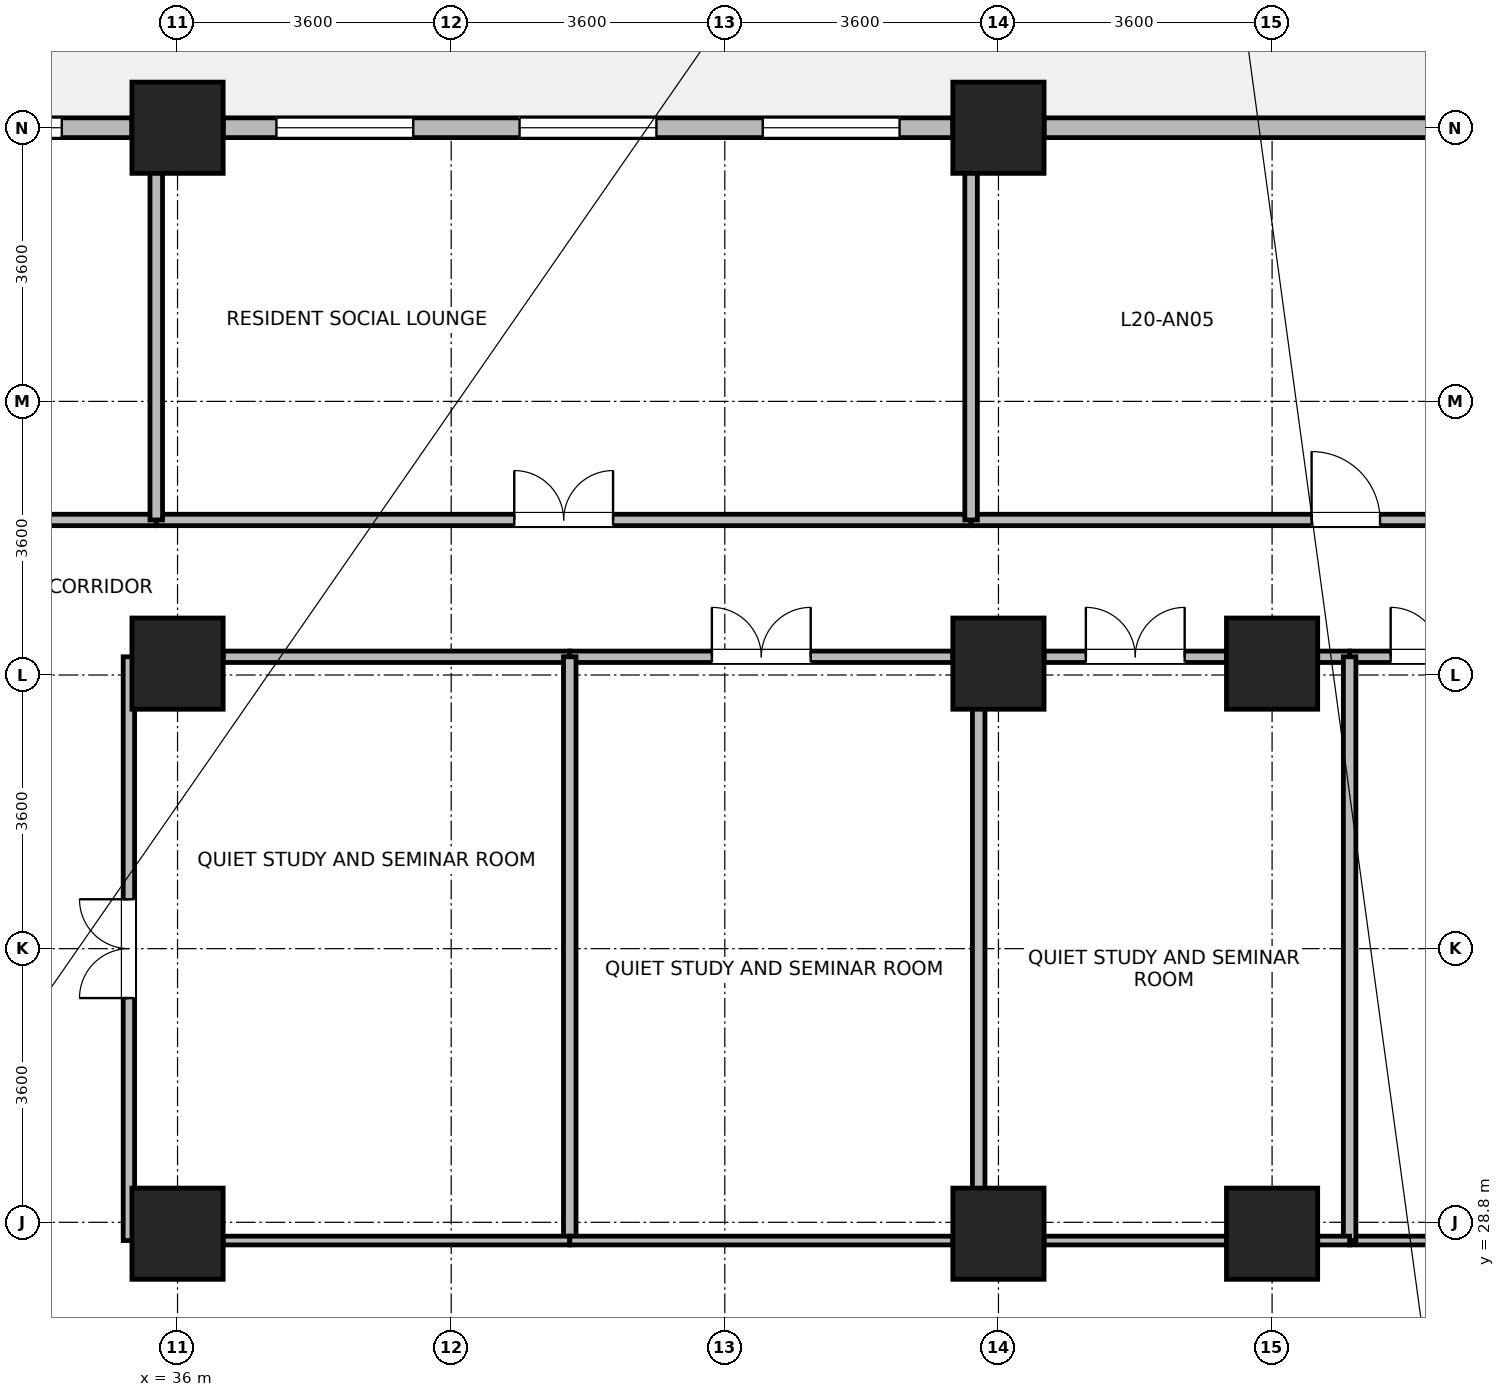
"""IFC4 building model, lengths in metres.
Left out: names, types, materials, properties, quantities, classifications, styles, units other than length and angle.
Written with IfcOpenShell. Run it as: python <this file> out.ifc"""

import sys

from ifc_helpers import new_model, si_unit, direction, frame, frame_2d, origin, origin_2d, place, context, subcontext, project, spatial, rectangle, extrude, source, transform, mapped, element, fill, save


model = new_model("IFC4")
c1 = context("Model", 3, precision=1e-05, world=origin(), true_north=direction((0.0, 1.0)))
c2 = subcontext(c1, "Body", "Model", "MODEL_VIEW")
j1 = project(units=[si_unit("LENGTHUNIT", "METRE"), si_unit("PLANEANGLEUNIT", "RADIAN")], contexts=[c1])
p1 = place(None, origin())
s1 = spatial("IfcSite", under=j1, at=p1, CompositionType="ELEMENT")
p2 = place(p1, origin())
s2 = spatial("IfcBuilding", under=s1, at=p2, CompositionType="ELEMENT")
p3 = place(p2, frame((0.0, 0.0, 82.3)))
s3 = spatial("IfcBuildingStorey", under=s2, at=p3, CompositionType="ELEMENT", Elevation=82.3)
m1 = source(origin(), c2, "Body", "SweptSolid", [
    extrude(rectangle(XDim=1.2, YDim=1.2, at=origin_2d()), origin(), (0.0, 0.0, 1.0), 3.7),
])
for number, where, z_axis, x_axis in (
    (1, (36.0, 43.2, 0.0), (0.0, 0.0, 1.0), (1.0, 0.0, 0.0)),
    (2, (36.0, 28.65, 0.0), (0.0, 0.0, 1.0), (1.0, 0.0, 0.0)),
    (3, (36.0, 36.15, 0.0), (0.0, 0.0, 1.0), (1.0, 0.0, 0.0)),
    (4, (46.8, 28.65, 0.0), (0.0, 0.0, 1.0), (1.0, 0.0, 0.0)),
    (5, (46.8, 36.15, 0.0), (0.0, 0.0, 1.0), (1.0, 0.0, 0.0)),
    (6, (46.8, 43.2, 0.0), (0.0, 0.0, 1.0), (1.0, 0.0, 0.0)),
    (7, (50.4, 28.65, 0.0), (0.0, 0.0, 1.0), (1.0, 0.0, 0.0)),
    (8, (50.4, 36.15, 0.0), (0.0, 0.0, 1.0), (1.0, 0.0, 0.0)),
):
    element("IfcColumn", number, at=place(p3, frame(where, z_axis=z_axis, x_axis=x_axis)), inside=s3, PredefinedType="COLUMN", context=c2, shape_type="MappedRepresentation", body=[
        mapped(m1, transform((0.0, 0.0, 0.0), x_axis=(1.0, 0.0, 0.0), y_axis=(0.0, 1.0, 0.0), z_axis=(0.0, 0.0, 1.0), scale=1.0)),
    ])
p4 = place(p3, frame((47.401, 43.2, 0.0), z_axis=(0.0, 0.0, 1.0), x_axis=(1.0, 0.0, 0.0)))
e9 = element("IfcWall", 9, at=p4, inside=s3, PredefinedType="STANDARD", context=c2, shape_type="SweptSolid", body=[
    extrude(rectangle(XDim=13.164, YDim=0.26, at=frame_2d((6.582, 0.0))), origin(), (0.0, 0.0, 1.0), 3.43),
])
p5 = place(p4, frame((5.832, 0.0, 0.0)))
e10 = element("IfcOpeningElement", 10, at=p5, cuts=e9, PredefinedType="OPENING", context=c2, shape_type="SweptSolid", body=[
    extrude(rectangle(XDim=1.5, YDim=2.15, at=frame_2d((0.75, 1.075))), frame((0.0, 0.14, 0.0), z_axis=(0.0, -1.0, 0.0), x_axis=(1.0, 0.0, 0.0)), (0.0, 0.0, 1.0), 0.28),
])
p6 = place(p3, frame((36.601, 43.2, 0.0), z_axis=(0.0, 0.0, 1.0), x_axis=(1.0, 0.0, 0.0)))
e11 = element("IfcWall", 11, at=p6, inside=s3, PredefinedType="STANDARD", context=c2, shape_type="SweptSolid", body=[
    extrude(rectangle(XDim=9.598, YDim=0.26, at=frame_2d((4.799, 0.0))), origin(), (0.0, 0.0, 1.0), 2.93),
])
p7 = place(p6, frame((0.7, 0.0, 0.85)))
e12 = element("IfcOpeningElement", 12, at=p7, cuts=e11, PredefinedType="OPENING", context=c2, shape_type="SweptSolid", body=[
    extrude(rectangle(XDim=1.8, YDim=1.85, at=frame_2d((0.9, 0.925))), frame((0.0, 0.14, 0.0), z_axis=(0.0, -1.0, 0.0), x_axis=(1.0, 0.0, 0.0)), (0.0, 0.0, 1.0), 0.28),
])
p8 = place(p6, frame((3.899, 0.0, 0.85)))
e13 = element("IfcOpeningElement", 13, at=p8, cuts=e11, PredefinedType="OPENING", context=c2, shape_type="SweptSolid", body=[
    extrude(rectangle(XDim=1.8, YDim=1.85, at=frame_2d((0.9, 0.925))), frame((0.0, 0.14, 0.0), z_axis=(0.0, -1.0, 0.0), x_axis=(1.0, 0.0, 0.0)), (0.0, 0.0, 1.0), 0.28),
])
p9 = place(p6, frame((7.098, 0.0, 0.85)))
e14 = element("IfcOpeningElement", 14, at=p9, cuts=e11, PredefinedType="OPENING", context=c2, shape_type="SweptSolid", body=[
    extrude(rectangle(XDim=1.8, YDim=1.85, at=frame_2d((0.9, 0.925))), frame((0.0, 0.14, 0.0), z_axis=(0.0, -1.0, 0.0), x_axis=(1.0, 0.0, 0.0)), (0.0, 0.0, 1.0), 0.28),
])
p10 = place(p3, frame((32.605, 43.2, 0.0), z_axis=(0.0, 0.0, 1.0), x_axis=(1.0, 0.0, 0.0)))
e15 = element("IfcWall", 15, at=p10, inside=s3, PredefinedType="STANDARD", context=c2, shape_type="SweptSolid", body=[
    extrude(rectangle(XDim=2.793, YDim=0.26, at=frame_2d((1.397, 0.0))), origin(), (0.0, 0.0, 1.0), 2.93),
])
p11 = place(p10, frame((0.922, 0.0, 0.85)))
e16 = element("IfcOpeningElement", 16, at=p11, cuts=e15, PredefinedType="OPENING", context=c2, shape_type="SweptSolid", body=[
    extrude(rectangle(XDim=0.95, YDim=1.75, at=frame_2d((0.475, 0.875))), frame((0.0, 0.14, 0.0), z_axis=(0.0, -1.0, 0.0), x_axis=(1.0, 0.0, 0.0)), (0.0, 0.0, 1.0), 0.28),
])
p12 = place(p3, frame((35.72, 38.04, 0.0), z_axis=(0.0, 0.0, 1.0), x_axis=(1.0, 0.0, 0.0)))
e17 = element("IfcWall", 17, at=p12, inside=s3, PredefinedType="PARTITIONING", context=c2, shape_type="SweptSolid", body=[
    extrude(rectangle(XDim=10.72, YDim=0.15, at=frame_2d((5.36, 0.0))), origin(), (0.0, 0.0, 1.0), 3.43),
])
p13 = place(p12, frame((4.71, 0.0, 0.0)))
e18 = element("IfcOpeningElement", 18, at=p13, cuts=e17, PredefinedType="OPENING", context=c2, shape_type="SweptSolid", body=[
    extrude(rectangle(XDim=1.3, YDim=2.12, at=frame_2d((0.65, 1.06))), frame((0.0, 0.085, 0.0), z_axis=(0.0, -1.0, 0.0), x_axis=(1.0, 0.0, 0.0)), (0.0, 0.0, 1.0), 0.17),
])
p14 = place(p3, frame((46.44, 38.04, 0.0), z_axis=(0.0, 0.0, 1.0), x_axis=(1.0, 0.0, 0.0)))
e19 = element("IfcWall", 19, at=p14, inside=s3, PredefinedType="PARTITIONING", context=c2, shape_type="SweptSolid", body=[
    extrude(rectangle(XDim=9.86, YDim=0.15, at=frame_2d((4.93, 0.0))), origin(), (0.0, 0.0, 1.0), 3.43),
])
p15 = place(p14, frame((4.48, 0.0, 0.0)))
e20 = element("IfcOpeningElement", 20, at=p15, cuts=e19, PredefinedType="OPENING", context=c2, shape_type="SweptSolid", body=[
    extrude(rectangle(XDim=0.9, YDim=2.08, at=frame_2d((0.45, 1.04))), frame((0.0, 0.085, 0.0), z_axis=(0.0, -1.0, 0.0), x_axis=(1.0, 0.0, 0.0)), (0.0, 0.0, 1.0), 0.17),
])
p16 = place(p3, frame((51.42, 36.24, 0.0), z_axis=(0.0, 0.0, 1.0), x_axis=(1.0, 0.0, 0.0)))
e21 = element("IfcWall", 21, at=p16, inside=s3, PredefinedType="PARTITIONING", context=c2, shape_type="SweptSolid", body=[
    extrude(rectangle(XDim=2.38, YDim=0.15, at=frame_2d((1.19, 0.0))), origin(), (0.0, 0.0, 1.0), 2.78),
])
p17 = place(p16, frame((0.54, 0.0, 0.0)))
e22 = element("IfcOpeningElement", 22, at=p17, cuts=e21, PredefinedType="OPENING", context=c2, shape_type="SweptSolid", body=[
    extrude(rectangle(XDim=1.3, YDim=2.12, at=frame_2d((0.65, 1.06))), frame((0.0, 0.085, 0.0), z_axis=(0.0, -1.0, 0.0), x_axis=(1.0, 0.0, 0.0)), (0.0, 0.0, 1.0), 0.17),
])
p18 = place(p3, frame((26.52, 38.04, 0.0), z_axis=(0.0, 0.0, 1.0), x_axis=(1.0, 0.0, 0.0)))
e23 = element("IfcWall", 23, at=p18, inside=s3, PredefinedType="PARTITIONING", context=c2, shape_type="SweptSolid", body=[
    extrude(rectangle(XDim=9.2, YDim=0.15, at=frame_2d((4.6, 0.0))), origin(), (0.0, 0.0, 1.0), 3.43),
])
p19 = place(p18, frame((4.15, 0.0, 0.0)))
e24 = element("IfcOpeningElement", 24, at=p19, cuts=e23, PredefinedType="OPENING", context=c2, shape_type="SweptSolid", body=[
    extrude(rectangle(XDim=0.9, YDim=2.08, at=frame_2d((0.45, 1.04))), frame((0.0, 0.085, 0.0), z_axis=(0.0, -1.0, 0.0), x_axis=(1.0, 0.0, 0.0)), (0.0, 0.0, 1.0), 0.17),
])
p20 = place(p3, frame((35.36, 28.56, 0.0), z_axis=(0.0, 0.0, 1.0), x_axis=(0.0, 1.0, 0.0)))
e25 = element("IfcWall", 25, at=p20, inside=s3, PredefinedType="PARTITIONING", context=c2, shape_type="SweptSolid", body=[
    extrude(rectangle(XDim=7.68, YDim=0.15, at=frame_2d((3.84, 0.0))), origin(), (0.0, 0.0, 1.0), 3.43),
])
p21 = place(p20, frame((3.19, 0.0, 0.0)))
e26 = element("IfcOpeningElement", 26, at=p21, cuts=e25, PredefinedType="OPENING", context=c2, shape_type="SweptSolid", body=[
    extrude(rectangle(XDim=1.3, YDim=2.12, at=frame_2d((0.65, 1.06))), frame((0.0, 0.085, 0.0), z_axis=(0.0, -1.0, 0.0), x_axis=(1.0, 0.0, 0.0)), (0.0, 0.0, 1.0), 0.17),
])
p22 = place(p3, frame((36.6, 36.24, 0.0), z_axis=(0.0, 0.0, 1.0), x_axis=(1.0, 0.0, 0.0)))
e27 = element("IfcWall", 27, at=p22, inside=s3, PredefinedType="PARTITIONING", context=c2, shape_type="SweptSolid", body=[
    extrude(rectangle(XDim=4.56, YDim=0.15, at=frame_2d((2.28, 0.0))), origin(), (0.0, 0.0, 1.0), 2.78),
])
p23 = place(p3, frame((41.16, 36.24, 0.0), z_axis=(0.0, 0.0, 1.0), x_axis=(1.0, 0.0, 0.0)))
e28 = element("IfcWall", 28, at=p23, inside=s3, PredefinedType="PARTITIONING", context=c2, shape_type="SweptSolid", body=[
    extrude(rectangle(XDim=5.04, YDim=0.15, at=frame_2d((2.52, 0.0))), origin(), (0.0, 0.0, 1.0), 2.78),
])
p24 = place(p23, frame((1.87, 0.0, 0.0)))
e29 = element("IfcOpeningElement", 29, at=p24, cuts=e28, PredefinedType="OPENING", context=c2, shape_type="SweptSolid", body=[
    extrude(rectangle(XDim=1.3, YDim=2.12, at=frame_2d((0.65, 1.06))), frame((0.0, 0.085, 0.0), z_axis=(0.0, -1.0, 0.0), x_axis=(1.0, 0.0, 0.0)), (0.0, 0.0, 1.0), 0.17),
])
p25 = place(p3, frame((47.4, 36.24, 0.0), z_axis=(0.0, 0.0, 1.0), x_axis=(1.0, 0.0, 0.0)))
e30 = element("IfcWall", 30, at=p25, inside=s3, PredefinedType="PARTITIONING", context=c2, shape_type="SweptSolid", body=[
    extrude(rectangle(XDim=2.4, YDim=0.15, at=frame_2d((1.2, 0.0))), origin(), (0.0, 0.0, 1.0), 2.78),
])
p26 = place(p25, frame((0.55, 0.0, 0.0)))
e31 = element("IfcOpeningElement", 31, at=p26, cuts=e30, PredefinedType="OPENING", context=c2, shape_type="SweptSolid", body=[
    extrude(rectangle(XDim=1.3, YDim=2.12, at=frame_2d((0.65, 1.06))), frame((0.0, 0.085, 0.0), z_axis=(0.0, -1.0, 0.0), x_axis=(1.0, 0.0, 0.0)), (0.0, 0.0, 1.0), 0.17),
])
p27 = place(p3, frame((51.0, 36.24, 0.0), z_axis=(0.0, 0.0, 1.0), x_axis=(1.0, 0.0, 0.0)))
e32 = element("IfcWall", 32, at=p27, inside=s3, PredefinedType="PARTITIONING", context=c2, shape_type="SweptSolid", body=[
    extrude(rectangle(XDim=0.42, YDim=0.15, at=frame_2d((0.21, 0.0))), origin(), (0.0, 0.0, 1.0), 2.78),
])
p28 = place(p3, frame((51.42, 28.56, 0.0), z_axis=(0.0, 0.0, 1.0), x_axis=(1.0, 0.0, 0.0)))
e33 = element("IfcWall", 33, at=p28, inside=s3, PredefinedType="PARTITIONING", context=c2, shape_type="SweptSolid", body=[
    extrude(rectangle(XDim=2.38, YDim=0.115, at=frame_2d((1.19, 0.0))), origin(), (0.0, 0.0, 1.0), 2.78),
])
for number, where, z_axis, x_axis in (
    (34, (41.16, 28.56, 0.0), (0.0, 0.0, 1.0), (0.0, 1.0, 0.0)),
    (35, (46.54, 28.56, 0.0), (0.0, 0.0, 1.0), (0.0, 1.0, 0.0)),
    (36, (51.42, 28.56, 0.0), (0.0, 0.0, 1.0), (0.0, 1.0, 0.0)),
):
    element("IfcWall", number, at=place(p3, frame(where, z_axis=z_axis, x_axis=x_axis)), inside=s3, PredefinedType="PARTITIONING", context=c2, shape_type="SweptSolid", body=[
        extrude(rectangle(XDim=7.68, YDim=0.165, at=frame_2d((3.84, 0.0))), origin(), (0.0, 0.0, 1.0), 3.43),
    ])
p29 = place(p3, frame((36.6, 28.56, 0.0), z_axis=(0.0, 0.0, 1.0), x_axis=(1.0, 0.0, 0.0)))
e37 = element("IfcWall", 37, at=p29, inside=s3, PredefinedType="PARTITIONING", context=c2, shape_type="SweptSolid", body=[
    extrude(rectangle(XDim=4.56, YDim=0.115, at=frame_2d((2.28, 0.0))), origin(), (0.0, 0.0, 1.0), 2.78),
])
p30 = place(p3, frame((41.16, 28.56, 0.0), z_axis=(0.0, 0.0, 1.0), x_axis=(1.0, 0.0, 0.0)))
e38 = element("IfcWall", 38, at=p30, inside=s3, PredefinedType="PARTITIONING", context=c2, shape_type="SweptSolid", body=[
    extrude(rectangle(XDim=5.04, YDim=0.115, at=frame_2d((2.52, 0.0))), origin(), (0.0, 0.0, 1.0), 2.78),
])
for number, where, z_axis, x_axis in (
    (39, (35.72, 38.04, 0.0), (0.0, 0.0, 1.0), (0.0, 1.0, 0.0)),
    (40, (46.44, 38.04, 0.0), (0.0, 0.0, 1.0), (0.0, 1.0, 0.0)),
):
    element("IfcWall", number, at=place(p3, frame(where, z_axis=z_axis, x_axis=x_axis)), inside=s3, PredefinedType="PARTITIONING", context=c2, shape_type="SweptSolid", body=[
        extrude(rectangle(XDim=5.028, YDim=0.165, at=frame_2d((2.514, 0.0))), origin(), (0.0, 0.0, 1.0), 3.43),
    ])
p31 = place(p3, frame((47.4, 28.56, 0.0), z_axis=(0.0, 0.0, 1.0), x_axis=(1.0, 0.0, 0.0)))
e41 = element("IfcWall", 41, at=p31, inside=s3, PredefinedType="PARTITIONING", context=c2, shape_type="SweptSolid", body=[
    extrude(rectangle(XDim=2.4, YDim=0.115, at=frame_2d((1.2, 0.0))), origin(), (0.0, 0.0, 1.0), 2.78),
])
p32 = place(p3, frame((51.0, 28.56, 0.0), z_axis=(0.0, 0.0, 1.0), x_axis=(1.0, 0.0, 0.0)))
e42 = element("IfcWall", 42, at=p32, inside=s3, PredefinedType="PARTITIONING", context=c2, shape_type="SweptSolid", body=[
    extrude(rectangle(XDim=0.42, YDim=0.115, at=frame_2d((0.21, 0.0))), origin(), (0.0, 0.0, 1.0), 2.78),
])
p33 = place(p7, origin())
e43 = element("IfcWindow", 43, at=p33, inside=s3, PartitioningType="SINGLE_PANEL", PredefinedType="WINDOW", context=c2, shape_type="SweptSolid", body=[
    extrude(rectangle(XDim=1.8, YDim=1.85, at=frame_2d((0.9, 0.925))), frame((0.0, 0.03, 0.0), z_axis=(0.0, -1.0, 0.0), x_axis=(1.0, 0.0, 0.0)), (0.0, 0.0, 1.0), 0.06),
])
fill(e12, e43)
p34 = place(p8, origin())
e44 = element("IfcWindow", 44, at=p34, inside=s3, PartitioningType="SINGLE_PANEL", PredefinedType="WINDOW", context=c2, shape_type="SweptSolid", body=[
    extrude(rectangle(XDim=1.8, YDim=1.85, at=frame_2d((0.9, 0.925))), frame((0.0, 0.03, 0.0), z_axis=(0.0, -1.0, 0.0), x_axis=(1.0, 0.0, 0.0)), (0.0, 0.0, 1.0), 0.06),
])
fill(e13, e44)
p35 = place(p9, origin())
e45 = element("IfcWindow", 45, at=p35, inside=s3, PartitioningType="SINGLE_PANEL", PredefinedType="WINDOW", context=c2, shape_type="SweptSolid", body=[
    extrude(rectangle(XDim=1.8, YDim=1.85, at=frame_2d((0.9, 0.925))), frame((0.0, 0.03, 0.0), z_axis=(0.0, -1.0, 0.0), x_axis=(1.0, 0.0, 0.0)), (0.0, 0.0, 1.0), 0.06),
])
fill(e14, e45)
p36 = place(p11, origin())
e46 = element("IfcWindow", 46, at=p36, inside=s3, PartitioningType="SINGLE_PANEL", PredefinedType="WINDOW", context=c2, shape_type="SweptSolid", body=[
    extrude(rectangle(XDim=0.95, YDim=1.75, at=frame_2d((0.475, 0.875))), frame((0.0, 0.03, 0.0), z_axis=(0.0, -1.0, 0.0), x_axis=(1.0, 0.0, 0.0)), (0.0, 0.0, 1.0), 0.06),
])
fill(e16, e46)
p37 = place(p13, origin())
e47 = element("IfcDoor", 47, at=p37, inside=s3, OperationType="DOUBLE_DOOR_SINGLE_SWING", PredefinedType="DOOR", context=c2, shape_type="SweptSolid", body=[
    extrude(rectangle(XDim=1.3, YDim=2.12, at=frame_2d((0.65, 1.06))), frame((0.0, 0.025, 0.0), z_axis=(0.0, -1.0, 0.0), x_axis=(1.0, 0.0, 0.0)), (0.0, 0.0, 1.0), 0.05),
])
fill(e18, e47)
p38 = place(p15, origin())
e48 = element("IfcDoor", 48, at=p38, inside=s3, OperationType="SINGLE_SWING_LEFT", PredefinedType="DOOR", context=c2, shape_type="SweptSolid", body=[
    extrude(rectangle(XDim=0.9, YDim=2.08, at=frame_2d((0.45, 1.04))), frame((0.0, 0.025, 0.0), z_axis=(0.0, -1.0, 0.0), x_axis=(1.0, 0.0, 0.0)), (0.0, 0.0, 1.0), 0.05),
])
fill(e20, e48)
p39 = place(p17, origin())
e49 = element("IfcDoor", 49, at=p39, inside=s3, OperationType="DOUBLE_DOOR_SINGLE_SWING", PredefinedType="DOOR", context=c2, shape_type="SweptSolid", body=[
    extrude(rectangle(XDim=1.3, YDim=2.12, at=frame_2d((0.65, 1.06))), frame((0.0, 0.025, 0.0), z_axis=(0.0, -1.0, 0.0), x_axis=(1.0, 0.0, 0.0)), (0.0, 0.0, 1.0), 0.05),
])
fill(e22, e49)
p40 = place(p21, origin())
e50 = element("IfcDoor", 50, at=p40, inside=s3, OperationType="DOUBLE_DOOR_SINGLE_SWING", PredefinedType="DOOR", context=c2, shape_type="SweptSolid", body=[
    extrude(rectangle(XDim=1.3, YDim=2.12, at=frame_2d((0.65, 1.06))), frame((0.0, 0.025, 0.0), z_axis=(0.0, -1.0, 0.0), x_axis=(1.0, 0.0, 0.0)), (0.0, 0.0, 1.0), 0.05),
])
fill(e26, e50)
p41 = place(p24, origin())
e51 = element("IfcDoor", 51, at=p41, inside=s3, OperationType="DOUBLE_DOOR_SINGLE_SWING", PredefinedType="DOOR", context=c2, shape_type="SweptSolid", body=[
    extrude(rectangle(XDim=1.3, YDim=2.12, at=frame_2d((0.65, 1.06))), frame((0.0, 0.025, 0.0), z_axis=(0.0, -1.0, 0.0), x_axis=(1.0, 0.0, 0.0)), (0.0, 0.0, 1.0), 0.05),
])
fill(e29, e51)
p42 = place(p26, origin())
e52 = element("IfcDoor", 52, at=p42, inside=s3, OperationType="DOUBLE_DOOR_SINGLE_SWING", PredefinedType="DOOR", context=c2, shape_type="SweptSolid", body=[
    extrude(rectangle(XDim=1.3, YDim=2.12, at=frame_2d((0.65, 1.06))), frame((0.0, 0.025, 0.0), z_axis=(0.0, -1.0, 0.0), x_axis=(1.0, 0.0, 0.0)), (0.0, 0.0, 1.0), 0.05),
])
fill(e31, e52)
save(model, sys.argv[1])
